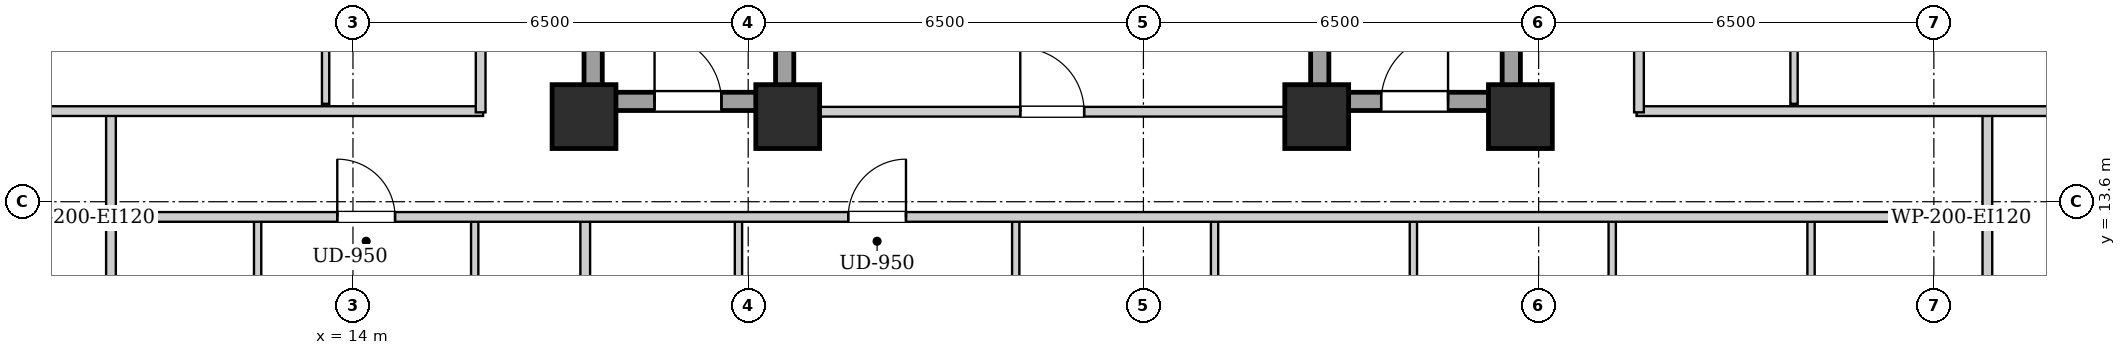
"""IFC4 building model, lengths in metres.
Left out: names, types, materials, properties, quantities, classifications, styles, units other than length and angle.
Written with IfcOpenShell. Run it as: python <this file> out.ifc"""

import sys

from ifc_helpers import new_model, si_unit, direction, frame, frame_2d, origin, origin_2d, place, context, subcontext, project, spatial, rectangle, extrude, element, fill, save


model = new_model("IFC4")
c1 = context("Model", 3, precision=1e-05, world=origin(), true_north=direction((0.0, 1.0)))
c2 = subcontext(c1, "Body", "Model", "MODEL_VIEW")
j1 = project(units=[si_unit("LENGTHUNIT", "METRE"), si_unit("PLANEANGLEUNIT", "RADIAN")], contexts=[c1])
p1 = place(None, origin())
s1 = spatial("IfcSite", under=j1, at=p1, CompositionType="ELEMENT")
p2 = place(p1, origin())
s2 = spatial("IfcBuilding", under=s1, at=p2, CompositionType="ELEMENT")
p3 = place(p2, frame((0.0, 0.0, 110.3)))
s3 = spatial("IfcBuildingStorey", under=s2, at=p3, CompositionType="ELEMENT", Elevation=110.3)
for number, where, z_axis, x_axis in (
    (1, (17.8, 15.0, 0.0), (0.0, 0.0, 1.0), (1.0, 0.0, 0.0)),
    (2, (21.15, 15.0, 0.0), (0.0, 0.0, 1.0), (1.0, 0.0, 0.0)),
    (3, (29.85, 15.0, 0.0), (0.0, 0.0, 1.0), (1.0, 0.0, 0.0)),
    (4, (33.2, 15.0, 0.0), (0.0, 0.0, 1.0), (1.0, 0.0, 0.0)),
):
    element("IfcColumn", number, at=place(p3, frame(where, z_axis=z_axis, x_axis=x_axis)), inside=s3, PredefinedType="COLUMN", context=c2, shape_type="SweptSolid", body=[
        extrude(rectangle(XDim=1.05, YDim=1.05, at=origin_2d()), origin(), (0.0, 0.0, 1.0), 3.2),
    ])
for number, where, z_axis, x_axis in (
    (5, (17.95, 15.1, 0.0), (0.0, 0.0, 1.0), (0.0, 1.0, 0.0)),
    (6, (21.1, 15.1, 0.0), (0.0, 0.0, 1.0), (0.0, 1.0, 0.0)),
):
    element("IfcWall", number, at=place(p3, frame(where, z_axis=z_axis, x_axis=x_axis)), inside=s3, PredefinedType="SHEAR", context=c2, shape_type="SweptSolid", body=[
        extrude(rectangle(XDim=9.0, YDim=0.3, at=frame_2d((4.5, 0.0))), origin(), (0.0, 0.0, 1.0), 2.94),
    ])
p4 = place(p3, frame((18.1, 15.25, 0.0), z_axis=(0.0, 0.0, 1.0), x_axis=(1.0, 0.0, 0.0)))
e7 = element("IfcWall", 7, at=p4, inside=s3, PredefinedType="SHEAR", context=c2, shape_type="SweptSolid", body=[
    extrude(rectangle(XDim=2.85, YDim=0.3, at=frame_2d((1.425, 0.0))), origin(), (0.0, 0.0, 1.0), 2.94),
])
p5 = place(p4, frame((0.86, 0.0, 0.0)))
e8 = element("IfcOpeningElement", 8, at=p5, cuts=e7, PredefinedType="OPENING", context=c2, shape_type="SweptSolid", body=[
    extrude(rectangle(XDim=1.1, YDim=2.05, at=frame_2d((0.55, 1.025))), frame((0.0, 0.16, 0.0), z_axis=(0.0, -1.0, 0.0), x_axis=(1.0, 0.0, 0.0)), (0.0, 0.0, 1.0), 0.32),
])
for number, where, z_axis, x_axis in (
    (9, (29.9, 15.1, 0.0), (0.0, 0.0, 1.0), (0.0, 1.0, 0.0)),
    (10, (33.05, 15.1, 0.0), (0.0, 0.0, 1.0), (0.0, 1.0, 0.0)),
):
    element("IfcWall", number, at=place(p3, frame(where, z_axis=z_axis, x_axis=x_axis)), inside=s3, PredefinedType="SHEAR", context=c2, shape_type="SweptSolid", body=[
        extrude(rectangle(XDim=9.0, YDim=0.3, at=frame_2d((4.5, 0.0))), origin(), (0.0, 0.0, 1.0), 2.94),
    ])
p6 = place(p3, frame((30.05, 15.25, 0.0), z_axis=(0.0, 0.0, 1.0), x_axis=(1.0, 0.0, 0.0)))
e11 = element("IfcWall", 11, at=p6, inside=s3, PredefinedType="SHEAR", context=c2, shape_type="SweptSolid", body=[
    extrude(rectangle(XDim=2.85, YDim=0.3, at=frame_2d((1.425, 0.0))), origin(), (0.0, 0.0, 1.0), 2.94),
])
p7 = place(p6, frame((0.86, 0.0, 0.0)))
e12 = element("IfcOpeningElement", 12, at=p7, cuts=e11, PredefinedType="OPENING", context=c2, shape_type="SweptSolid", body=[
    extrude(rectangle(XDim=1.1, YDim=2.05, at=frame_2d((0.55, 1.025))), frame((0.0, 0.16, 0.0), z_axis=(0.0, -1.0, 0.0), x_axis=(1.0, 0.0, 0.0)), (0.0, 0.0, 1.0), 0.32),
])
p8 = place(p3, frame((21.25, 15.08, 0.0), z_axis=(0.0, 0.0, 1.0), x_axis=(1.0, 0.0, 0.0)))
e13 = element("IfcWall", 13, at=p8, inside=s3, PredefinedType="PARTITIONING", context=c2, shape_type="SweptSolid", body=[
    extrude(rectangle(XDim=8.5, YDim=0.16, at=frame_2d((4.25, 0.0))), origin(), (0.0, 0.0, 1.0), 2.313),
])
p9 = place(p8, frame((3.725, 0.0, 0.0)))
e14 = element("IfcOpeningElement", 14, at=p9, cuts=e13, PredefinedType="OPENING", context=c2, shape_type="SweptSolid", body=[
    extrude(rectangle(XDim=1.05, YDim=2.05, at=frame_2d((0.525, 1.025))), frame((0.0, 0.09, 0.0), z_axis=(0.0, -1.0, 0.0), x_axis=(1.0, 0.0, 0.0)), (0.0, 0.0, 1.0), 0.18),
])
for number, where, z_axis, x_axis in (
    (15, (10.02, 13.35, 0.0), (0.0, 0.0, 1.0), (0.0, 1.0, 0.0)),
    (16, (40.88, 13.35, 0.0), (0.0, 0.0, 1.0), (0.0, 1.0, 0.0)),
):
    element("IfcWall", number, at=place(p3, frame(where, z_axis=z_axis, x_axis=x_axis)), inside=s3, PredefinedType="PARTITIONING", context=c2, shape_type="SweptSolid", body=[
        extrude(rectangle(XDim=1.74, YDim=0.16, at=frame_2d((0.87, 0.0))), origin(), (0.0, 0.0, 1.0), 2.94),
    ])
p10 = place(p3, frame((7.78, 15.09, 0.0), z_axis=(0.0, 0.0, 1.0), x_axis=(1.0, 0.0, 0.0)))
e17 = element("IfcWall", 17, at=p10, inside=s3, PredefinedType="PARTITIONING", context=c2, shape_type="SweptSolid", body=[
    extrude(rectangle(XDim=8.36, YDim=0.16, at=frame_2d((4.18, 0.0))), origin(), (0.0, 0.0, 1.0), 2.313),
])
p11 = place(p3, frame((35.11, 15.09, 0.0), z_axis=(0.0, 0.0, 1.0), x_axis=(1.0, 0.0, 0.0)))
e18 = element("IfcWall", 18, at=p11, inside=s3, PredefinedType="PARTITIONING", context=c2, shape_type="SweptSolid", body=[
    extrude(rectangle(XDim=8.01, YDim=0.16, at=frame_2d((4.005, 0.0))), origin(), (0.0, 0.0, 1.0), 2.313),
])
p12 = place(p3, frame((10.02, 10.4, 0.0), z_axis=(0.0, 0.0, 1.0), x_axis=(0.0, 1.0, 0.0)))
e19 = element("IfcWall", 19, at=p12, inside=s3, PredefinedType="PARTITIONING", context=c2, shape_type="SweptSolid", body=[
    extrude(rectangle(XDim=2.91, YDim=0.16, at=frame_2d((1.455, 0.0))), origin(), (0.0, 0.0, 1.0), 2.94),
])
p13 = place(p3, frame((12.432, 10.46, 0.0), z_axis=(0.0, 0.0, 1.0), x_axis=(0.0, 1.0, 0.0)))
e20 = element("IfcWall", 20, at=p13, inside=s3, PredefinedType="PARTITIONING", context=c2, shape_type="SweptSolid", body=[
    extrude(rectangle(XDim=2.85, YDim=0.12, at=frame_2d((1.425, 0.0))), origin(), (0.0, 0.0, 1.0), 2.94),
])
p14 = place(p13, frame((0.995, 0.0, 0.0)))
e21 = element("IfcOpeningElement", 21, at=p14, cuts=e20, PredefinedType="OPENING", context=c2, shape_type="SweptSolid", body=[
    extrude(rectangle(XDim=0.86, YDim=2.05, at=frame_2d((0.43, 1.025))), frame((0.0, 0.07, 0.0), z_axis=(0.0, -1.0, 0.0), x_axis=(1.0, 0.0, 0.0)), (0.0, 0.0, 1.0), 0.14),
])
p15 = place(p3, frame((16.002, 10.46, 0.0), z_axis=(0.0, 0.0, 1.0), x_axis=(0.0, 1.0, 0.0)))
e22 = element("IfcWall", 22, at=p15, inside=s3, PredefinedType="PARTITIONING", context=c2, shape_type="SweptSolid", body=[
    extrude(rectangle(XDim=2.85, YDim=0.12, at=frame_2d((1.425, 0.0))), origin(), (0.0, 0.0, 1.0), 2.94),
])
p16 = place(p15, frame((0.975, 0.0, 0.0)))
e23 = element("IfcOpeningElement", 23, at=p16, cuts=e22, PredefinedType="OPENING", context=c2, shape_type="SweptSolid", body=[
    extrude(rectangle(XDim=0.9, YDim=2.05, at=frame_2d((0.45, 1.025))), frame((0.0, 0.07, 0.0), z_axis=(0.0, -1.0, 0.0), x_axis=(1.0, 0.0, 0.0)), (0.0, 0.0, 1.0), 0.14),
])
p17 = place(p3, frame((40.88, 10.4, 0.0), z_axis=(0.0, 0.0, 1.0), x_axis=(0.0, 1.0, 0.0)))
e24 = element("IfcWall", 24, at=p17, inside=s3, PredefinedType="PARTITIONING", context=c2, shape_type="SweptSolid", body=[
    extrude(rectangle(XDim=2.91, YDim=0.16, at=frame_2d((1.455, 0.0))), origin(), (0.0, 0.0, 1.0), 2.94),
])
p18 = place(p3, frame((17.82, 2.26, 0.0), z_axis=(0.0, 0.0, 1.0), x_axis=(0.0, 1.0, 0.0)))
e25 = element("IfcWall", 25, at=p18, inside=s3, PredefinedType="PARTITIONING", context=c2, shape_type="SweptSolid", body=[
    extrude(rectangle(XDim=11.05, YDim=0.16, at=frame_2d((5.525, 0.0))), origin(), (0.0, 0.0, 1.0), 2.313),
])
p19 = place(p3, frame((20.34, 10.46, 0.0), z_axis=(0.0, 0.0, 1.0), x_axis=(0.0, 1.0, 0.0)))
e26 = element("IfcWall", 26, at=p19, inside=s3, PredefinedType="PARTITIONING", context=c2, shape_type="SweptSolid", body=[
    extrude(rectangle(XDim=2.85, YDim=0.12, at=frame_2d((1.425, 0.0))), origin(), (0.0, 0.0, 1.0), 2.94),
])
p20 = place(p19, frame((0.995, 0.0, 0.0)))
e27 = element("IfcOpeningElement", 27, at=p20, cuts=e26, PredefinedType="OPENING", context=c2, shape_type="SweptSolid", body=[
    extrude(rectangle(XDim=0.86, YDim=2.05, at=frame_2d((0.43, 1.025))), frame((0.0, 0.07, 0.0), z_axis=(0.0, -1.0, 0.0), x_axis=(1.0, 0.0, 0.0)), (0.0, 0.0, 1.0), 0.14),
])
p21 = place(p3, frame((24.9, 10.46, 0.0), z_axis=(0.0, 0.0, 1.0), x_axis=(0.0, 1.0, 0.0)))
e28 = element("IfcWall", 28, at=p21, inside=s3, PredefinedType="PARTITIONING", context=c2, shape_type="SweptSolid", body=[
    extrude(rectangle(XDim=2.85, YDim=0.12, at=frame_2d((1.425, 0.0))), origin(), (0.0, 0.0, 1.0), 2.94),
])
p22 = place(p21, frame((0.975, 0.0, 0.0)))
e29 = element("IfcOpeningElement", 29, at=p22, cuts=e28, PredefinedType="OPENING", context=c2, shape_type="SweptSolid", body=[
    extrude(rectangle(XDim=0.9, YDim=2.05, at=frame_2d((0.45, 1.025))), frame((0.0, 0.07, 0.0), z_axis=(0.0, -1.0, 0.0), x_axis=(1.0, 0.0, 0.0)), (0.0, 0.0, 1.0), 0.14),
])
p23 = place(p3, frame((28.17, 10.46, 0.0), z_axis=(0.0, 0.0, 1.0), x_axis=(0.0, 1.0, 0.0)))
e30 = element("IfcWall", 30, at=p23, inside=s3, PredefinedType="PARTITIONING", context=c2, shape_type="SweptSolid", body=[
    extrude(rectangle(XDim=2.85, YDim=0.12, at=frame_2d((1.425, 0.0))), origin(), (0.0, 0.0, 1.0), 2.94),
])
p24 = place(p23, frame((0.975, 0.0, 0.0)))
e31 = element("IfcOpeningElement", 31, at=p24, cuts=e30, PredefinedType="OPENING", context=c2, shape_type="SweptSolid", body=[
    extrude(rectangle(XDim=0.9, YDim=2.05, at=frame_2d((0.45, 1.025))), frame((0.0, 0.07, 0.0), z_axis=(0.0, -1.0, 0.0), x_axis=(1.0, 0.0, 0.0)), (0.0, 0.0, 1.0), 0.14),
])
p25 = place(p3, frame((31.44, 10.46, 0.0), z_axis=(0.0, 0.0, 1.0), x_axis=(0.0, 1.0, 0.0)))
e32 = element("IfcWall", 32, at=p25, inside=s3, PredefinedType="PARTITIONING", context=c2, shape_type="SweptSolid", body=[
    extrude(rectangle(XDim=2.85, YDim=0.12, at=frame_2d((1.425, 0.0))), origin(), (0.0, 0.0, 1.0), 2.94),
])
p26 = place(p25, frame((0.975, 0.0, 0.0)))
e33 = element("IfcOpeningElement", 33, at=p26, cuts=e32, PredefinedType="OPENING", context=c2, shape_type="SweptSolid", body=[
    extrude(rectangle(XDim=0.9, YDim=2.05, at=frame_2d((0.45, 1.025))), frame((0.0, 0.07, 0.0), z_axis=(0.0, -1.0, 0.0), x_axis=(1.0, 0.0, 0.0)), (0.0, 0.0, 1.0), 0.14),
])
p27 = place(p3, frame((34.71, 10.46, 0.0), z_axis=(0.0, 0.0, 1.0), x_axis=(0.0, 1.0, 0.0)))
e34 = element("IfcWall", 34, at=p27, inside=s3, PredefinedType="PARTITIONING", context=c2, shape_type="SweptSolid", body=[
    extrude(rectangle(XDim=2.85, YDim=0.12, at=frame_2d((1.425, 0.0))), origin(), (0.0, 0.0, 1.0), 2.94),
])
p28 = place(p27, frame((0.975, 0.0, 0.0)))
e35 = element("IfcOpeningElement", 35, at=p28, cuts=e34, PredefinedType="OPENING", context=c2, shape_type="SweptSolid", body=[
    extrude(rectangle(XDim=0.9, YDim=2.05, at=frame_2d((0.45, 1.025))), frame((0.0, 0.07, 0.0), z_axis=(0.0, -1.0, 0.0), x_axis=(1.0, 0.0, 0.0)), (0.0, 0.0, 1.0), 0.14),
])
p29 = place(p3, frame((37.98, 10.46, 0.0), z_axis=(0.0, 0.0, 1.0), x_axis=(0.0, 1.0, 0.0)))
e36 = element("IfcWall", 36, at=p29, inside=s3, PredefinedType="PARTITIONING", context=c2, shape_type="SweptSolid", body=[
    extrude(rectangle(XDim=2.85, YDim=0.12, at=frame_2d((1.425, 0.0))), origin(), (0.0, 0.0, 1.0), 2.94),
])
p30 = place(p29, frame((0.975, 0.0, 0.0)))
e37 = element("IfcOpeningElement", 37, at=p30, cuts=e36, PredefinedType="OPENING", context=c2, shape_type="SweptSolid", body=[
    extrude(rectangle(XDim=0.9, YDim=2.05, at=frame_2d((0.45, 1.025))), frame((0.0, 0.07, 0.0), z_axis=(0.0, -1.0, 0.0), x_axis=(1.0, 0.0, 0.0)), (0.0, 0.0, 1.0), 0.14),
])
for number, where, z_axis, x_axis in (
    (38, (13.55, 15.21, 0.0), (0.0, 0.0, 1.0), (0.0, 1.0, 0.0)),
    (39, (37.7, 15.21, 0.0), (0.0, 0.0, 1.0), (0.0, 1.0, 0.0)),
):
    element("IfcWall", number, at=place(p3, frame(where, z_axis=z_axis, x_axis=x_axis)), inside=s3, PredefinedType="PARTITIONING", context=c2, shape_type="SweptSolid", body=[
        extrude(rectangle(XDim=2.159, YDim=0.12, at=frame_2d((1.08, 0.0))), origin(), (0.0, 0.0, 1.0), 2.94),
    ])
p31 = place(p3, frame((10.05, 13.35, 0.0), z_axis=(0.0, 0.0, 1.0), x_axis=(1.0, 0.0, 0.0)))
e40 = element("IfcWall", 40, at=p31, inside=s3, PredefinedType="PARTITIONING", context=c2, shape_type="SweptSolid", body=[
    extrude(rectangle(XDim=30.8, YDim=0.16, at=frame_2d((15.4, 0.0))), origin(), (0.0, 0.0, 1.0), 2.94),
])
p32 = place(p31, frame((3.692, 0.0, 0.0)))
e41 = element("IfcOpeningElement", 41, at=p32, cuts=e40, PredefinedType="OPENING", context=c2, shape_type="SweptSolid", body=[
    extrude(rectangle(XDim=0.95, YDim=2.1, at=frame_2d((0.475, 1.05))), frame((0.0, 0.09, 0.0), z_axis=(0.0, -1.0, 0.0), x_axis=(1.0, 0.0, 0.0)), (0.0, 0.0, 1.0), 0.18),
])
p33 = place(p31, frame((12.095, 0.0, 0.0)))
e42 = element("IfcOpeningElement", 42, at=p33, cuts=e40, PredefinedType="OPENING", context=c2, shape_type="SweptSolid", body=[
    extrude(rectangle(XDim=0.95, YDim=2.1, at=frame_2d((0.475, 1.05))), frame((0.0, 0.09, 0.0), z_axis=(0.0, -1.0, 0.0), x_axis=(1.0, 0.0, 0.0)), (0.0, 0.0, 1.0), 0.18),
])
p34 = place(p3, frame((16.1, 15.07, 0.0), z_axis=(0.0, 0.0, 1.0), x_axis=(0.0, 1.0, 0.0)))
e43 = element("IfcWall", 43, at=p34, inside=s3, PredefinedType="PARTITIONING", context=c2, shape_type="SweptSolid", body=[
    extrude(rectangle(XDim=13.93, YDim=0.16, at=frame_2d((6.965, 0.0))), origin(), (0.0, 0.0, 1.0), 2.94),
])
p35 = place(p34, frame((4.661, 0.0, 0.0)))
e44 = element("IfcOpeningElement", 44, at=p35, cuts=e43, PredefinedType="OPENING", context=c2, shape_type="SweptSolid", body=[
    extrude(rectangle(XDim=0.95, YDim=2.1, at=frame_2d((0.475, 1.05))), frame((0.0, 0.09, 0.0), z_axis=(0.0, -1.0, 0.0), x_axis=(1.0, 0.0, 0.0)), (0.0, 0.0, 1.0), 0.18),
])
p36 = place(p34, frame((11.411, 0.0, 0.0)))
e45 = element("IfcOpeningElement", 45, at=p36, cuts=e43, PredefinedType="OPENING", context=c2, shape_type="SweptSolid", body=[
    extrude(rectangle(XDim=0.95, YDim=2.1, at=frame_2d((0.475, 1.05))), frame((0.0, 0.09, 0.0), z_axis=(0.0, -1.0, 0.0), x_axis=(1.0, 0.0, 0.0)), (0.0, 0.0, 1.0), 0.18),
])
p37 = place(p3, frame((35.15, 15.07, 0.0), z_axis=(0.0, 0.0, 1.0), x_axis=(0.0, 1.0, 0.0)))
e46 = element("IfcWall", 46, at=p37, inside=s3, PredefinedType="PARTITIONING", context=c2, shape_type="SweptSolid", body=[
    extrude(rectangle(XDim=13.93, YDim=0.16, at=frame_2d((6.965, 0.0))), origin(), (0.0, 0.0, 1.0), 2.94),
])
p38 = place(p37, frame((4.661, 0.0, 0.0)))
e47 = element("IfcOpeningElement", 47, at=p38, cuts=e46, PredefinedType="OPENING", context=c2, shape_type="SweptSolid", body=[
    extrude(rectangle(XDim=0.95, YDim=2.1, at=frame_2d((0.475, 1.05))), frame((0.0, 0.09, 0.0), z_axis=(0.0, -1.0, 0.0), x_axis=(1.0, 0.0, 0.0)), (0.0, 0.0, 1.0), 0.18),
])
p39 = place(p37, frame((11.411, 0.0, 0.0)))
e48 = element("IfcOpeningElement", 48, at=p39, cuts=e46, PredefinedType="OPENING", context=c2, shape_type="SweptSolid", body=[
    extrude(rectangle(XDim=0.95, YDim=2.1, at=frame_2d((0.475, 1.05))), frame((0.0, 0.09, 0.0), z_axis=(0.0, -1.0, 0.0), x_axis=(1.0, 0.0, 0.0)), (0.0, 0.0, 1.0), 0.18),
])
p40 = place(p5, origin())
e49 = element("IfcDoor", 49, at=p40, inside=s3, OperationType="SINGLE_SWING_LEFT", PredefinedType="DOOR", context=c2, shape_type="SweptSolid", body=[
    extrude(rectangle(XDim=1.1, YDim=2.05, at=frame_2d((0.55, 1.025))), frame((0.0, 0.025, 0.0), z_axis=(0.0, -1.0, 0.0), x_axis=(1.0, 0.0, 0.0)), (0.0, 0.0, 1.0), 0.05),
])
fill(e8, e49)
p41 = place(p7, origin())
e50 = element("IfcDoor", 50, at=p41, inside=s3, OperationType="SINGLE_SWING_RIGHT", PredefinedType="DOOR", context=c2, shape_type="SweptSolid", body=[
    extrude(rectangle(XDim=1.1, YDim=2.05, at=frame_2d((0.55, 1.025))), frame((0.0, 0.025, 0.0), z_axis=(0.0, -1.0, 0.0), x_axis=(1.0, 0.0, 0.0)), (0.0, 0.0, 1.0), 0.05),
])
fill(e12, e50)
p42 = place(p9, origin())
e51 = element("IfcDoor", 51, at=p42, inside=s3, OperationType="SINGLE_SWING_LEFT", PredefinedType="DOOR", context=c2, shape_type="SweptSolid", body=[
    extrude(rectangle(XDim=1.05, YDim=2.05, at=frame_2d((0.525, 1.025))), frame((0.0, 0.025, 0.0), z_axis=(0.0, -1.0, 0.0), x_axis=(1.0, 0.0, 0.0)), (0.0, 0.0, 1.0), 0.05),
])
fill(e14, e51)
p43 = place(p32, origin())
e52 = element("IfcDoor", 52, at=p43, inside=s3, OperationType="SINGLE_SWING_LEFT", PredefinedType="DOOR", context=c2, shape_type="SweptSolid", body=[
    extrude(rectangle(XDim=0.95, YDim=2.1, at=frame_2d((0.475, 1.05))), frame((0.0, 0.025, 0.0), z_axis=(0.0, -1.0, 0.0), x_axis=(1.0, 0.0, 0.0)), (0.0, 0.0, 1.0), 0.05),
])
fill(e41, e52)
p44 = place(p33, origin())
e53 = element("IfcDoor", 53, at=p44, inside=s3, OperationType="SINGLE_SWING_RIGHT", PredefinedType="DOOR", context=c2, shape_type="SweptSolid", body=[
    extrude(rectangle(XDim=0.95, YDim=2.1, at=frame_2d((0.475, 1.05))), frame((0.0, 0.025, 0.0), z_axis=(0.0, -1.0, 0.0), x_axis=(1.0, 0.0, 0.0)), (0.0, 0.0, 1.0), 0.05),
])
fill(e42, e53)
save(model, sys.argv[1])
